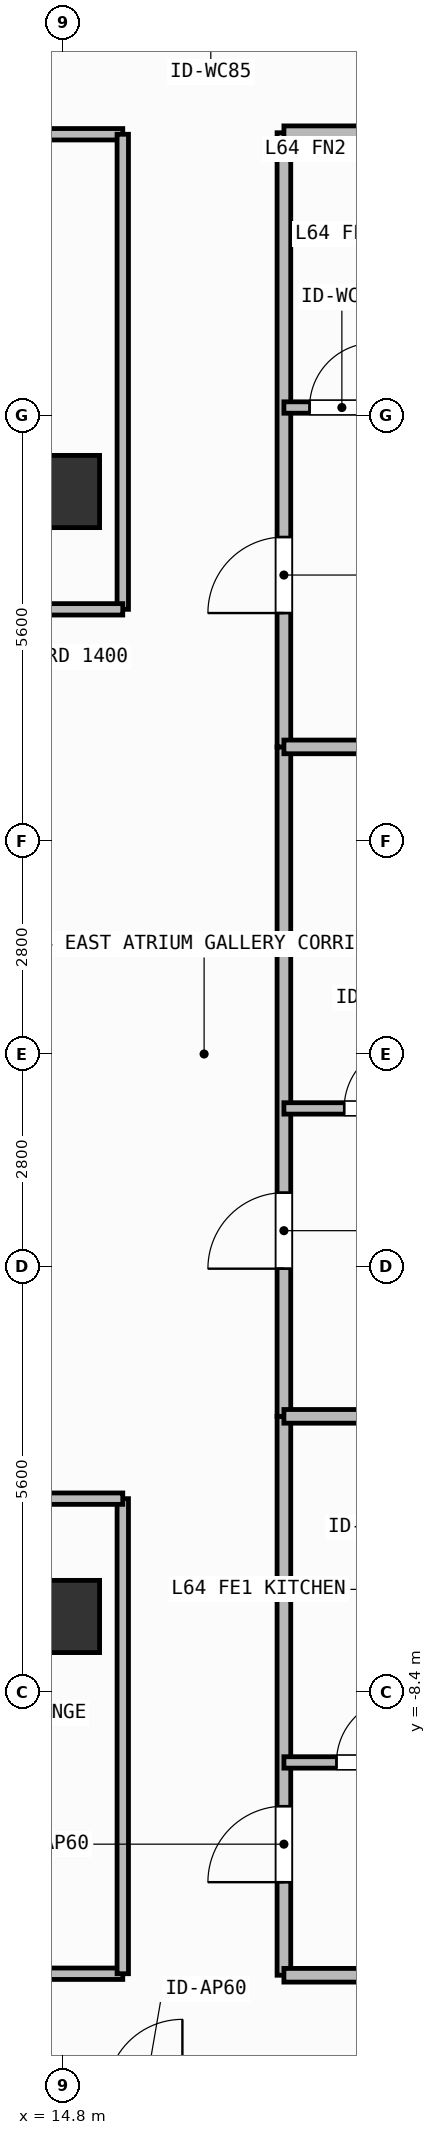
"""IFC4 building model, lengths in metres.
Left out: names, types, materials, properties, quantities, classifications, styles, units other than length and angle.
Written with IfcOpenShell. Run it as: python <this file> out.ifc"""

import sys

from ifc_helpers import new_model, si_unit, direction, frame, frame_2d, origin, origin_2d, place, context, subcontext, project, spatial, rectangle, extrude, element, fill, save


model = new_model("IFC4")
c1 = context("Model", 3, precision=1e-05, world=origin(), true_north=direction((0.0, 1.0)))
c2 = subcontext(c1, "Body", "Model", "MODEL_VIEW")
j1 = project(units=[si_unit("LENGTHUNIT", "METRE"), si_unit("PLANEANGLEUNIT", "RADIAN")], contexts=[c1])
p1 = place(None, origin())
s1 = spatial("IfcSite", under=j1, at=p1, CompositionType="ELEMENT")
p2 = place(p1, origin())
s2 = spatial("IfcBuilding", under=s1, at=p2, CompositionType="ELEMENT")
p3 = place(p2, frame((0.0, 0.0, 262.5)))
s3 = spatial("IfcBuildingStorey", under=s2, at=p3, CompositionType="ELEMENT", Elevation=262.5)
for number, where, z_axis, x_axis in (
    (1, (14.8, -7.4, 0.0), (0.0, 0.0, 1.0), (1.0, 0.0, 0.0)),
    (2, (14.8, 7.4, 0.0), (0.0, 0.0, 1.0), (1.0, 0.0, 0.0)),
):
    element("IfcColumn", number, at=place(p3, frame(where, z_axis=z_axis, x_axis=x_axis)), inside=s3, PredefinedType="COLUMN", context=c2, shape_type="SweptSolid", body=[
        extrude(rectangle(XDim=0.95, YDim=0.95, at=origin_2d()), origin(), (0.0, 0.0, 1.0), 3.9),
    ])
p4 = place(p3, frame((10.1, -12.1, 0.0), z_axis=(0.0, 0.0, 1.0), x_axis=(1.0, 0.0, 0.0)))
e3 = element("IfcWall", 3, at=p4, inside=s3, PredefinedType="PARTITIONING", context=c2, shape_type="SweptSolid", body=[
    extrude(rectangle(XDim=5.48, YDim=0.15, at=frame_2d((2.74, 0.0))), origin(), (0.0, 0.0, 1.0), 3.68),
])
p5 = place(p4, frame((2.29, 0.0, 0.0)))
e4 = element("IfcOpeningElement", 4, at=p5, cuts=e3, PredefinedType="OPENING", context=c2, shape_type="SweptSolid", body=[
    extrude(rectangle(XDim=0.9, YDim=2.1, at=frame_2d((0.45, 1.05))), frame((0.0, 0.085, 0.0), z_axis=(0.0, -1.0, 0.0), x_axis=(1.0, 0.0, 0.0)), (0.0, 0.0, 1.0), 0.17),
])
p6 = place(p3, frame((8.36, 12.1, 0.0), z_axis=(0.0, 0.0, 1.0), x_axis=(1.0, 0.0, 0.0)))
e5 = element("IfcWall", 5, at=p6, inside=s3, PredefinedType="PARTITIONING", context=c2, shape_type="SweptSolid", body=[
    extrude(rectangle(XDim=7.22, YDim=0.15, at=frame_2d((3.61, 0.0))), origin(), (0.0, 0.0, 1.0), 3.68),
])
p7 = place(p6, frame((3.513, 0.0, 0.0)))
e6 = element("IfcOpeningElement", 6, at=p7, cuts=e5, PredefinedType="OPENING", context=c2, shape_type="SweptSolid", body=[
    extrude(rectangle(XDim=0.9, YDim=2.1, at=frame_2d((0.45, 1.05))), frame((0.0, 0.085, 0.0), z_axis=(0.0, -1.0, 0.0), x_axis=(1.0, 0.0, 0.0)), (0.0, 0.0, 1.0), 0.17),
])
p8 = place(p3, frame((17.7, -12.12, 0.0), z_axis=(0.0, 0.0, 1.0), x_axis=(0.0, 1.0, 0.0)))
e7 = element("IfcWall", 7, at=p8, inside=s3, PredefinedType="PARTITIONING", context=c2, shape_type="SweptSolid", body=[
    extrude(rectangle(XDim=7.353, YDim=0.18, at=frame_2d((3.677, 0.0))), origin(), (0.0, 0.0, 1.0), 3.68),
])
p9 = place(p8, frame((1.225, 0.0, 0.0)))
e8 = element("IfcOpeningElement", 8, at=p9, cuts=e7, PredefinedType="OPENING", context=c2, shape_type="SweptSolid", body=[
    extrude(rectangle(XDim=1.0, YDim=2.2, at=frame_2d((0.5, 1.1))), frame((0.0, 0.1, 0.0), z_axis=(0.0, -1.0, 0.0), x_axis=(1.0, 0.0, 0.0)), (0.0, 0.0, 1.0), 0.2),
])
p10 = place(p3, frame((17.7, -9.32, 0.0), z_axis=(0.0, 0.0, 1.0), x_axis=(1.0, 0.0, 0.0)))
e9 = element("IfcWall", 9, at=p10, inside=s3, PredefinedType="PARTITIONING", context=c2, shape_type="SweptSolid", body=[
    extrude(rectangle(XDim=2.233, YDim=0.15, at=frame_2d((1.117, 0.0))), origin(), (0.0, 0.0, 1.0), 3.68),
])
p11 = place(p10, frame((0.691, 0.0, 0.0)))
e10 = element("IfcOpeningElement", 10, at=p11, cuts=e9, PredefinedType="OPENING", context=c2, shape_type="SweptSolid", body=[
    extrude(rectangle(XDim=0.85, YDim=2.1, at=frame_2d((0.425, 1.05))), frame((0.0, 0.085, 0.0), z_axis=(0.0, -1.0, 0.0), x_axis=(1.0, 0.0, 0.0)), (0.0, 0.0, 1.0), 0.17),
])
p12 = place(p3, frame((17.7, -4.767, 0.0), z_axis=(0.0, 0.0, 1.0), x_axis=(0.0, 1.0, 0.0)))
e11 = element("IfcWall", 11, at=p12, inside=s3, PredefinedType="PARTITIONING", context=c2, shape_type="SweptSolid", body=[
    extrude(rectangle(XDim=8.807, YDim=0.18, at=frame_2d((4.404, 0.0))), origin(), (0.0, 0.0, 1.0), 3.68),
])
p13 = place(p12, frame((1.943, 0.0, 0.0)))
e12 = element("IfcOpeningElement", 12, at=p13, cuts=e11, PredefinedType="OPENING", context=c2, shape_type="SweptSolid", body=[
    extrude(rectangle(XDim=1.0, YDim=2.2, at=frame_2d((0.5, 1.1))), frame((0.0, 0.1, 0.0), z_axis=(0.0, -1.0, 0.0), x_axis=(1.0, 0.0, 0.0)), (0.0, 0.0, 1.0), 0.2),
])
p14 = place(p3, frame((17.7, -0.716, 0.0), z_axis=(0.0, 0.0, 1.0), x_axis=(1.0, 0.0, 0.0)))
e13 = element("IfcWall", 13, at=p14, inside=s3, PredefinedType="PARTITIONING", context=c2, shape_type="SweptSolid", body=[
    extrude(rectangle(XDim=2.277, YDim=0.15, at=frame_2d((1.139, 0.0))), origin(), (0.0, 0.0, 1.0), 3.68),
])
p15 = place(p14, frame((0.792, 0.0, 0.0)))
e14 = element("IfcOpeningElement", 14, at=p15, cuts=e13, PredefinedType="OPENING", context=c2, shape_type="SweptSolid", body=[
    extrude(rectangle(XDim=0.85, YDim=2.1, at=frame_2d((0.425, 1.05))), frame((0.0, 0.085, 0.0), z_axis=(0.0, -1.0, 0.0), x_axis=(1.0, 0.0, 0.0)), (0.0, 0.0, 1.0), 0.17),
])
p16 = place(p3, frame((17.7, 4.04, 0.0), z_axis=(0.0, 0.0, 1.0), x_axis=(0.0, 1.0, 0.0)))
e15 = element("IfcWall", 15, at=p16, inside=s3, PredefinedType="PARTITIONING", context=c2, shape_type="SweptSolid", body=[
    extrude(rectangle(XDim=8.08, YDim=0.18, at=frame_2d((4.04, 0.0))), origin(), (0.0, 0.0, 1.0), 3.68),
])
p17 = place(p16, frame((1.761, 0.0, 0.0)))
e16 = element("IfcOpeningElement", 16, at=p17, cuts=e15, PredefinedType="OPENING", context=c2, shape_type="SweptSolid", body=[
    extrude(rectangle(XDim=1.0, YDim=2.2, at=frame_2d((0.5, 1.1))), frame((0.0, 0.1, 0.0), z_axis=(0.0, -1.0, 0.0), x_axis=(1.0, 0.0, 0.0)), (0.0, 0.0, 1.0), 0.2),
])
p18 = place(p3, frame((17.7, 8.505, 0.0), z_axis=(0.0, 0.0, 1.0), x_axis=(1.0, 0.0, 0.0)))
e17 = element("IfcWall", 17, at=p18, inside=s3, PredefinedType="PARTITIONING", context=c2, shape_type="SweptSolid", body=[
    extrude(rectangle(XDim=2.59, YDim=0.15, at=frame_2d((1.295, 0.0))), origin(), (0.0, 0.0, 1.0), 3.68),
])
p19 = place(p18, frame((0.337, 0.0, 0.0)))
e18 = element("IfcOpeningElement", 18, at=p19, cuts=e17, PredefinedType="OPENING", context=c2, shape_type="SweptSolid", body=[
    extrude(rectangle(XDim=0.85, YDim=2.1, at=frame_2d((0.425, 1.05))), frame((0.0, 0.085, 0.0), z_axis=(0.0, -1.0, 0.0), x_axis=(1.0, 0.0, 0.0)), (0.0, 0.0, 1.0), 0.17),
])
p20 = place(p3, frame((15.58, -12.1, 0.0), z_axis=(0.0, 0.0, 1.0), x_axis=(0.0, 1.0, 0.0)))
e19 = element("IfcWall", 19, at=p20, inside=s3, PredefinedType="PARTITIONING", context=c2, shape_type="SweptSolid", body=[
    extrude(rectangle(XDim=6.25, YDim=0.15, at=frame_2d((3.125, 0.0))), origin(), (0.0, 0.0, 1.0), 3.68),
])
p21 = place(p3, frame((8.96, -5.85, 0.0), z_axis=(0.0, 0.0, 1.0), x_axis=(1.0, 0.0, 0.0)))
e20 = element("IfcWall", 20, at=p21, inside=s3, PredefinedType="PARTITIONING", context=c2, shape_type="SweptSolid", body=[
    extrude(rectangle(XDim=6.62, YDim=0.15, at=frame_2d((3.31, 0.0))), origin(), (0.0, 0.0, 1.0), 3.68),
])
p22 = place(p3, frame((15.58, 5.85, 0.0), z_axis=(0.0, 0.0, 1.0), x_axis=(0.0, 1.0, 0.0)))
e21 = element("IfcWall", 21, at=p22, inside=s3, PredefinedType="PARTITIONING", context=c2, shape_type="SweptSolid", body=[
    extrude(rectangle(XDim=6.25, YDim=0.15, at=frame_2d((3.125, 0.0))), origin(), (0.0, 0.0, 1.0), 3.68),
])
p23 = place(p3, frame((8.96, 5.85, 0.0), z_axis=(0.0, 0.0, 1.0), x_axis=(1.0, 0.0, 0.0)))
e22 = element("IfcWall", 22, at=p23, inside=s3, PredefinedType="PARTITIONING", context=c2, shape_type="SweptSolid", body=[
    extrude(rectangle(XDim=6.62, YDim=0.15, at=frame_2d((3.31, 0.0))), origin(), (0.0, 0.0, 1.0), 3.68),
])
for number, where, z_axis, x_axis in (
    (23, (17.7, -4.767, 0.0), (0.0, 0.0, 1.0), (1.0, 0.0, 0.0)),
    (24, (17.7, 4.04, 0.0), (0.0, 0.0, 1.0), (1.0, 0.0, 0.0)),
    (25, (17.7, -12.12, 0.0), (0.0, 0.0, 1.0), (1.0, 0.0, 0.0)),
    (26, (17.7, 12.12, 0.0), (0.0, 0.0, 1.0), (1.0, 0.0, 0.0)),
):
    element("IfcWall", number, at=place(p3, frame(where, z_axis=z_axis, x_axis=x_axis)), inside=s3, PredefinedType="PARTITIONING", context=c2, shape_type="SweptSolid", body=[
        extrude(rectangle(XDim=7.03, YDim=0.18, at=frame_2d((3.515, 0.0))), origin(), (0.0, 0.0, 1.0), 3.68),
    ])
p24 = place(p9, origin())
e27 = element("IfcDoor", 27, at=p24, inside=s3, OperationType="SINGLE_SWING_LEFT", PredefinedType="DOOR", context=c2, shape_type="SweptSolid", body=[
    extrude(rectangle(XDim=1.0, YDim=2.2, at=frame_2d((0.5, 1.1))), frame((0.0, 0.025, 0.0), z_axis=(0.0, -1.0, 0.0), x_axis=(1.0, 0.0, 0.0)), (0.0, 0.0, 1.0), 0.05),
])
fill(e8, e27)
p25 = place(p11, origin())
e28 = element("IfcDoor", 28, at=p25, inside=s3, OperationType="SINGLE_SWING_RIGHT", PredefinedType="DOOR", context=c2, shape_type="SweptSolid", body=[
    extrude(rectangle(XDim=0.85, YDim=2.1, at=frame_2d((0.425, 1.05))), frame((0.0, 0.025, 0.0), z_axis=(0.0, -1.0, 0.0), x_axis=(1.0, 0.0, 0.0)), (0.0, 0.0, 1.0), 0.05),
])
fill(e10, e28)
p26 = place(p13, origin())
e29 = element("IfcDoor", 29, at=p26, inside=s3, OperationType="SINGLE_SWING_LEFT", PredefinedType="DOOR", context=c2, shape_type="SweptSolid", body=[
    extrude(rectangle(XDim=1.0, YDim=2.2, at=frame_2d((0.5, 1.1))), frame((0.0, 0.025, 0.0), z_axis=(0.0, -1.0, 0.0), x_axis=(1.0, 0.0, 0.0)), (0.0, 0.0, 1.0), 0.05),
])
fill(e12, e29)
p27 = place(p15, origin())
e30 = element("IfcDoor", 30, at=p27, inside=s3, OperationType="SINGLE_SWING_RIGHT", PredefinedType="DOOR", context=c2, shape_type="SweptSolid", body=[
    extrude(rectangle(XDim=0.85, YDim=2.1, at=frame_2d((0.425, 1.05))), frame((0.0, 0.025, 0.0), z_axis=(0.0, -1.0, 0.0), x_axis=(1.0, 0.0, 0.0)), (0.0, 0.0, 1.0), 0.05),
])
fill(e14, e30)
p28 = place(p17, origin())
e31 = element("IfcDoor", 31, at=p28, inside=s3, OperationType="SINGLE_SWING_LEFT", PredefinedType="DOOR", context=c2, shape_type="SweptSolid", body=[
    extrude(rectangle(XDim=1.0, YDim=2.2, at=frame_2d((0.5, 1.1))), frame((0.0, 0.025, 0.0), z_axis=(0.0, -1.0, 0.0), x_axis=(1.0, 0.0, 0.0)), (0.0, 0.0, 1.0), 0.05),
])
fill(e16, e31)
p29 = place(p19, origin())
e32 = element("IfcDoor", 32, at=p29, inside=s3, OperationType="SINGLE_SWING_RIGHT", PredefinedType="DOOR", context=c2, shape_type="SweptSolid", body=[
    extrude(rectangle(XDim=0.85, YDim=2.1, at=frame_2d((0.425, 1.05))), frame((0.0, 0.025, 0.0), z_axis=(0.0, -1.0, 0.0), x_axis=(1.0, 0.0, 0.0)), (0.0, 0.0, 1.0), 0.05),
])
fill(e18, e32)
save(model, sys.argv[1])
